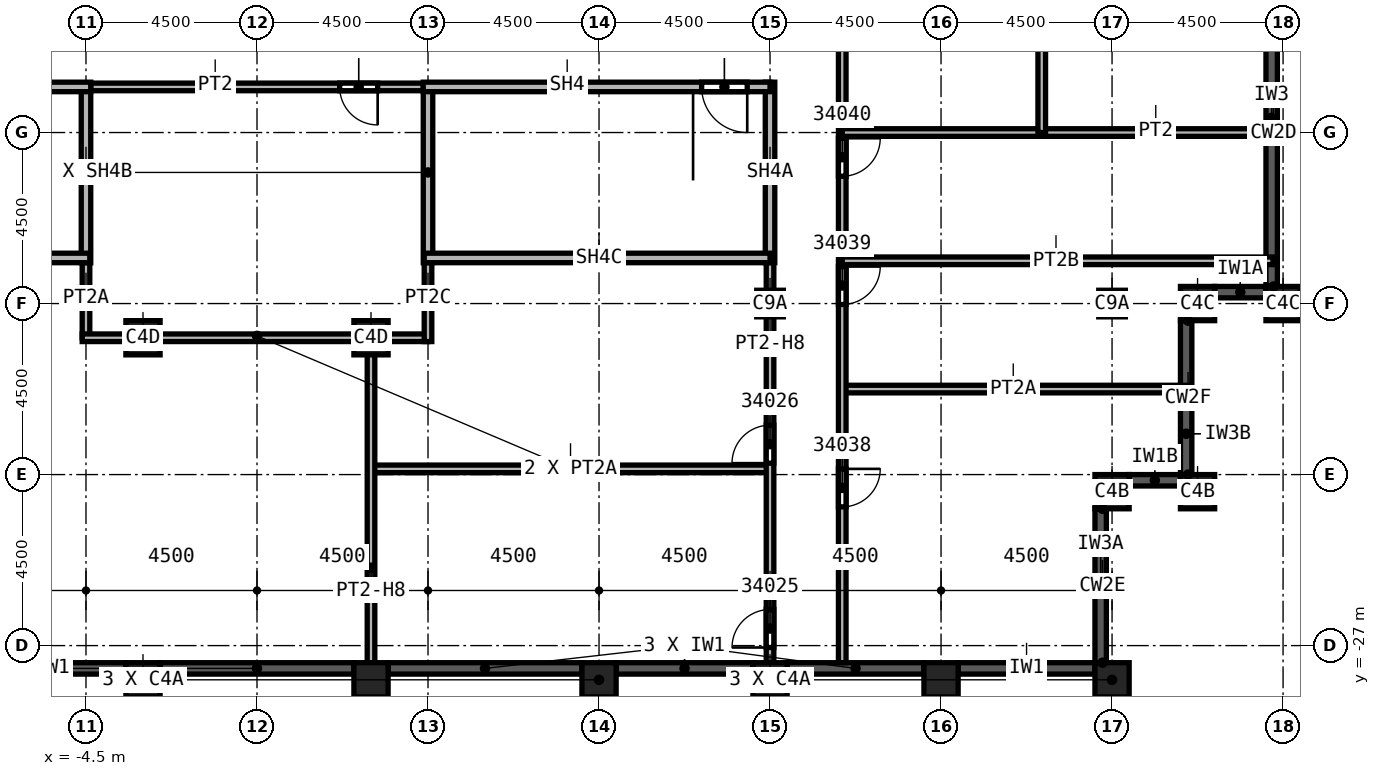
"""IFC4 building model, lengths in metres.
Left out: names, types, materials, properties, quantities, classifications, styles, units other than length and angle.
Written with IfcOpenShell. Run it as: python <this file> out.ifc"""

import sys

from ifc_helpers import new_model, si_unit, direction, frame, frame_2d, origin, origin_2d, place, context, subcontext, project, spatial, polyline, rectangle, outline, extrude, element, fill, save


model = new_model("IFC4")
c1 = context("Model", 3, precision=1e-05, world=origin(), true_north=direction((0.0, 1.0)))
c2 = subcontext(c1, "Body", "Model", "MODEL_VIEW")
j1 = project(units=[si_unit("LENGTHUNIT", "METRE"), si_unit("PLANEANGLEUNIT", "RADIAN")], contexts=[c1])
p1 = place(None, origin())
s1 = spatial("IfcSite", under=j1, at=p1, CompositionType="ELEMENT")
p2 = place(p1, origin())
s2 = spatial("IfcBuilding", under=s1, at=p2, CompositionType="ELEMENT")
p3 = place(p2, frame((0.0, 0.0, 366.0)))
s3 = spatial("IfcBuildingStorey", under=s2, at=p3, CompositionType="ELEMENT", Elevation=366.0)
for number, where, z_axis, x_axis in (
    (1, (13.5, -18.0, 0.0), (0.0, 0.0, 1.0), (1.0, 0.0, 0.0)),
    (2, (22.5, -18.0, 0.0), (0.0, 0.0, 1.0), (1.0, 0.0, 0.0)),
):
    element("IfcColumn", number, at=place(p3, frame(where, z_axis=z_axis, x_axis=x_axis)), inside=s3, PredefinedType="COLUMN", context=c2, shape_type="SweptSolid", body=[
        extrude(rectangle(XDim=0.7, YDim=0.7, at=origin_2d()), origin(), (0.0, 0.0, 1.0), 9.532),
    ])
p4 = place(p3, frame((27.0, -18.0, 0.0), z_axis=(0.0, 0.0, 1.0), x_axis=(0.0, 1.0, 0.0)))
e3 = element("IfcColumn", 3, at=p4, inside=s3, PredefinedType="COLUMN", context=c2, shape_type="SweptSolid", body=[
    extrude(rectangle(XDim=0.9, YDim=0.9, at=origin_2d()), origin(), (0.0, 0.0, 1.0), 9.532),
])
for number, where, z_axis, x_axis in (
    (4, (3.0, -27.9, 0.0), (0.0, 0.0, 1.0), (1.0, 0.0, 0.0)),
    (5, (9.0, -27.9, 0.0), (0.0, 0.0, 1.0), (1.0, 0.0, 0.0)),
    (6, (13.5, -27.9, 0.0), (0.0, 0.0, 1.0), (1.0, 0.0, 0.0)),
    (7, (18.0, -27.9, 0.0), (0.0, 0.0, 1.0), (1.0, 0.0, 0.0)),
    (8, (22.5, -27.9, 0.0), (0.0, 0.0, 1.0), (1.0, 0.0, 0.0)),
    (9, (-3.0, -27.9, 0.0), (0.0, 0.0, 1.0), (1.0, 0.0, 0.0)),
):
    element("IfcColumn", number, at=place(p3, frame(where, z_axis=z_axis, x_axis=x_axis)), inside=s3, PredefinedType="COLUMN", context=c2, shape_type="SweptSolid", body=[
        extrude(rectangle(XDim=0.9, YDim=0.9, at=origin_2d()), origin(), (0.0, 0.0, 1.0), 4.919),
    ])
for number, where, z_axis, x_axis in (
    (10, (3.0, -18.9, 0.0), (0.0, 0.0, 1.0), (1.0, 0.0, 0.0)),
    (11, (-3.0, -18.9, 0.0), (0.0, 0.0, 1.0), (1.0, 0.0, 0.0)),
):
    element("IfcColumn", number, at=place(p3, frame(where, z_axis=z_axis, x_axis=x_axis)), inside=s3, PredefinedType="COLUMN", context=c2, shape_type="SweptSolid", body=[
        extrude(rectangle(XDim=0.9, YDim=0.9, at=origin_2d()), origin(), (0.0, 0.0, 1.0), 9.113),
    ])
for number, where, z_axis, x_axis in (
    (12, (22.5, -22.95, 0.0), (0.0, 0.0, 1.0), (1.0, 0.0, 0.0)),
    (13, (24.75, -22.95, 0.0), (0.0, 0.0, 1.0), (1.0, 0.0, 0.0)),
):
    element("IfcColumn", number, at=place(p3, frame(where, z_axis=z_axis, x_axis=x_axis)), inside=s3, PredefinedType="COLUMN", context=c2, shape_type="SweptSolid", body=[
        extrude(rectangle(XDim=0.9, YDim=0.9, at=origin_2d()), origin(), (0.0, 0.0, 1.0), 7.225),
    ])
p5 = place(p3, frame((24.75, -18.0, 0.0), z_axis=(0.0, 0.0, 1.0), x_axis=(1.0, 0.0, 0.0)))
e14 = element("IfcColumn", 14, at=p5, inside=s3, PredefinedType="COLUMN", context=c2, shape_type="SweptSolid", body=[
    extrude(rectangle(XDim=0.9, YDim=0.9, at=origin_2d()), origin(), (0.0, 0.0, 1.0), 9.532),
])
for number, where, z_axis, x_axis in (
    (15, (-8.55, -27.6, 0.0), (0.0, 0.0, 1.0), (1.0, 0.0, 0.0)),
    (16, (-2.55, -27.6, 0.0), (0.0, 0.0, 1.0), (1.0, 0.0, 0.0)),
    (17, (3.45, -27.6, 0.0), (0.0, 0.0, 1.0), (1.0, 0.0, 0.0)),
):
    element("IfcWall", number, at=place(p3, frame(where, z_axis=z_axis, x_axis=x_axis)), inside=s3, PredefinedType="SOLIDWALL", context=c2, shape_type="SweptSolid", body=[
        extrude(rectangle(XDim=5.1, YDim=0.3, at=frame_2d((2.55, 0.0))), origin(), (0.0, 0.0, 1.0), 5.4),
    ])
for number, where, z_axis, x_axis in (
    (18, (9.45, -27.6, 0.0), (0.0, 0.0, 1.0), (1.0, 0.0, 0.0)),
    (19, (13.95, -27.6, 0.0), (0.0, 0.0, 1.0), (1.0, 0.0, 0.0)),
    (20, (18.45, -27.6, 0.0), (0.0, 0.0, 1.0), (1.0, 0.0, 0.0)),
):
    element("IfcWall", number, at=place(p3, frame(where, z_axis=z_axis, x_axis=x_axis)), inside=s3, PredefinedType="SOLIDWALL", context=c2, shape_type="SweptSolid", body=[
        extrude(rectangle(XDim=3.6, YDim=0.3, at=frame_2d((1.8, 0.0))), origin(), (0.0, 0.0, 1.0), 5.4),
    ])
p6 = place(p3, frame((22.2, -27.45, 5.633), z_axis=(0.0, 0.0, 1.0), x_axis=(0.0, 1.0, 0.0)))
e21 = element("IfcWall", 21, at=p6, inside=s3, PredefinedType="SOLIDWALL", context=c2, shape_type="SweptSolid", body=[
    extrude(outline(polyline([(0.0, 0.0), (4.05, 0.0), (4.05, 1.84), (0.0, 0.05), (0.0, 0.0)])), frame((0.0, 0.15, 0.0), z_axis=(0.0, -1.0, 0.0), x_axis=(1.0, 0.0, 0.0)), (0.0, 0.0, 1.0), 0.3),
])
p7 = place(p3, frame((22.95, -22.65, 0.0), z_axis=(0.0, 0.0, 1.0), x_axis=(1.0, 0.0, 0.0)))
e22 = element("IfcWall", 22, at=p7, inside=s3, PredefinedType="SOLIDWALL", context=c2, shape_type="SweptSolid", body=[
    extrude(rectangle(XDim=1.35, YDim=0.3, at=frame_2d((0.675, 0.0))), origin(), (0.0, 0.0, 1.0), 7.707),
])
p8 = place(p3, frame((24.45, -22.5, 7.939), z_axis=(0.0, 0.0, 1.0), x_axis=(0.0, 1.0, 0.0)))
e23 = element("IfcWall", 23, at=p8, inside=s3, PredefinedType="SOLIDWALL", context=c2, shape_type="SweptSolid", body=[
    extrude(outline(polyline([(0.0, 0.0), (4.05, 0.0), (4.05, 1.841), (0.0, 0.05), (0.0, 0.0)])), frame((0.0, 0.15, 0.0), z_axis=(0.0, -1.0, 0.0), x_axis=(1.0, 0.0, 0.0)), (0.0, 0.0, 1.0), 0.3),
])
p9 = place(p3, frame((25.2, -17.7, 0.0), z_axis=(0.0, 0.0, 1.0), x_axis=(1.0, 0.0, 0.0)))
e24 = element("IfcWall", 24, at=p9, inside=s3, PredefinedType="SOLIDWALL", context=c2, shape_type="SweptSolid", body=[
    extrude(rectangle(XDim=1.35, YDim=0.3, at=frame_2d((0.675, 0.0))), origin(), (0.0, 0.0, 1.0), 10.013),
])
p10 = place(p3, frame((26.7, -17.55, 10.246), z_axis=(0.0, 0.0, 1.0), x_axis=(0.0, 1.0, 0.0)))
e25 = element("IfcWall", 25, at=p10, inside=s3, PredefinedType="SOLIDWALL", context=c2, shape_type="SweptSolid", body=[
    extrude(outline(polyline([(0.0, 0.0), (8.1, 0.0), (8.1, 3.728), (0.0, 0.05), (0.0, 0.0)])), frame((0.0, 0.15, 0.0), z_axis=(0.0, -1.0, 0.0), x_axis=(1.0, 0.0, 0.0)), (0.0, 0.0, 1.0), 0.3),
])
p11 = place(p3, frame((-4.5, -18.9, 0.0), z_axis=(0.0, 0.0, 1.0), x_axis=(0.0, 1.0, 0.0)))
e26 = element("IfcWall", 26, at=p11, inside=s3, PredefinedType="PARTITIONING", context=c2, shape_type="SweptSolid", body=[
    extrude(rectangle(XDim=2.1, YDim=0.2, at=frame_2d((1.05, 0.0))), origin(), (0.0, 0.0, 1.0), 5.76),
])
p12 = place(p3, frame((4.5, -18.9, 0.0), z_axis=(0.0, 0.0, 1.0), x_axis=(-1.0, 0.0, 0.0)))
e27 = element("IfcWall", 27, at=p12, inside=s3, PredefinedType="PARTITIONING", context=c2, shape_type="SweptSolid", body=[
    extrude(rectangle(XDim=9.1, YDim=0.2, at=frame_2d((4.55, 0.0))), origin(), (0.0, 0.0, 1.0), 5.76),
])
p13 = place(p3, frame((3.0, -22.35, 0.0), z_axis=(0.0, 0.0, 1.0), x_axis=(1.0, 0.0, 0.0)))
e28 = element("IfcWall", 28, at=p13, inside=s3, PredefinedType="PARTITIONING", context=c2, shape_type="SweptSolid", body=[
    extrude(rectangle(XDim=10.5, YDim=0.2, at=frame_2d((5.25, 0.0))), origin(), (0.0, 0.0, 1.0), 5.76),
])
p14 = place(p3, frame((3.0, -18.9, 0.0), z_axis=(0.0, 0.0, 1.0), x_axis=(0.0, -1.0, 0.0)))
e29 = element("IfcWall", 29, at=p14, inside=s3, PredefinedType="PARTITIONING", context=c2, shape_type="SweptSolid", body=[
    extrude(rectangle(XDim=8.55, YDim=0.2, at=frame_2d((4.275, 0.0))), origin(), (0.0, 0.0, 1.0), 4.916),
])
p15 = place(p3, frame((4.5, -16.8, 0.0), z_axis=(0.0, 0.0, 1.0), x_axis=(0.0, -1.0, 0.0)))
e30 = element("IfcWall", 30, at=p15, inside=s3, PredefinedType="PARTITIONING", context=c2, shape_type="SweptSolid", body=[
    extrude(rectangle(XDim=2.2, YDim=0.2, at=frame_2d((1.1, 0.0))), origin(), (0.0, 0.0, 1.0), 8.136),
])
p16 = place(p3, frame((4.625, -12.3, 0.0), z_axis=(0.0, 0.0, 1.0), x_axis=(-1.0, 0.0, 0.0)))
e31 = element("IfcWall", 31, at=p16, inside=s3, PredefinedType="PARTITIONING", context=c2, shape_type="SweptSolid", body=[
    extrude(rectangle(XDim=9.25, YDim=0.2, at=frame_2d((4.625, 0.0))), origin(), (0.0, 0.0, 1.0), 9.15),
])
p17 = place(p16, frame((1.45, 0.0, 0.0)))
e32 = element("IfcOpeningElement", 32, at=p17, cuts=e31, PredefinedType="OPENING", context=c2, shape_type="SweptSolid", body=[
    extrude(rectangle(XDim=1.0, YDim=2.1, at=frame_2d((0.5, 1.05))), frame((0.0, 0.1, 0.0), z_axis=(0.0, -1.0, 0.0), x_axis=(1.0, 0.0, 0.0)), (0.0, 0.0, 1.0), 0.2),
])
p18 = place(p3, frame((13.5, -27.45, 0.0), z_axis=(0.0, 0.0, 1.0), x_axis=(0.0, 1.0, 0.0)))
e33 = element("IfcWall", 33, at=p18, inside=s3, PredefinedType="PARTITIONING", context=c2, shape_type="SweptSolid", body=[
    extrude(rectangle(XDim=10.775, YDim=0.2, at=frame_2d((5.387, 0.0))), origin(), (0.0, 0.0, 1.0), 4.916),
])
p19 = place(p18, frame((0.4, 0.0, 0.0)))
e34 = element("IfcOpeningElement", 34, at=p19, cuts=e33, PredefinedType="OPENING", context=c2, shape_type="SweptSolid", body=[
    extrude(rectangle(XDim=1.0, YDim=2.1, at=frame_2d((0.5, 1.05))), frame((0.0, 0.1, 0.0), z_axis=(0.0, -1.0, 0.0), x_axis=(1.0, 0.0, 0.0)), (0.0, 0.0, 1.0), 0.2),
])
p20 = place(p18, frame((5.25, 0.0, 0.0)))
e35 = element("IfcOpeningElement", 35, at=p20, cuts=e33, PredefinedType="OPENING", context=c2, shape_type="SweptSolid", body=[
    extrude(rectangle(XDim=1.0, YDim=2.1, at=frame_2d((0.5, 1.05))), frame((0.0, 0.1, 0.0), z_axis=(0.0, -1.0, 0.0), x_axis=(1.0, 0.0, 0.0)), (0.0, 0.0, 1.0), 0.2),
])
p21 = place(p3, frame((15.4, -20.25, 0.0), z_axis=(0.0, 0.0, 1.0), x_axis=(1.0, 0.0, 0.0)))
e36 = element("IfcWall", 36, at=p21, inside=s3, PredefinedType="PARTITIONING", context=c2, shape_type="SweptSolid", body=[
    extrude(rectangle(XDim=9.086, YDim=0.2, at=frame_2d((4.543, 0.0))), origin(), (0.0, 0.0, 1.0), 5.76),
])
p22 = place(p3, frame((15.4, 27.636, 0.0), z_axis=(0.0, 0.0, 1.0), x_axis=(0.0, -1.0, 0.0)))
e37 = element("IfcWall", 37, at=p22, inside=s3, PredefinedType="PARTITIONING", context=c2, shape_type="SweptSolid", body=[
    extrude(rectangle(XDim=55.086, YDim=0.2, at=frame_2d((27.543, 0.0))), origin(), (0.0, 0.0, 1.0), 5.76),
])
p23 = place(p22, frame((26.436, 0.0, 0.0)))
e38 = element("IfcOpeningElement", 38, at=p23, cuts=e37, PredefinedType="OPENING", context=c2, shape_type="SweptSolid", body=[
    extrude(rectangle(XDim=1.0, YDim=2.1, at=frame_2d((0.5, 1.05))), frame((0.0, 0.1, 0.0), z_axis=(0.0, -1.0, 0.0), x_axis=(1.0, 0.0, 0.0)), (0.0, 0.0, 1.0), 0.2),
])
p24 = place(p22, frame((21.936, 0.0, 0.0)))
e39 = element("IfcOpeningElement", 39, at=p24, cuts=e37, PredefinedType="OPENING", context=c2, shape_type="SweptSolid", body=[
    extrude(rectangle(XDim=1.0, YDim=2.1, at=frame_2d((0.5, 1.05))), frame((0.0, 0.1, 0.0), z_axis=(0.0, -1.0, 0.0), x_axis=(1.0, 0.0, 0.0)), (0.0, 0.0, 1.0), 0.2),
])
p25 = place(p22, frame((9.7, 0.0, 0.0)))
e40 = element("IfcOpeningElement", 40, at=p25, cuts=e37, PredefinedType="OPENING", context=c2, shape_type="SweptSolid", body=[
    extrude(rectangle(XDim=1.0, YDim=2.1, at=frame_2d((0.5, 1.05))), frame((0.0, 0.1, 0.0), z_axis=(0.0, -1.0, 0.0), x_axis=(1.0, 0.0, 0.0)), (0.0, 0.0, 1.0), 0.2),
])
p26 = place(p22, frame((49.986, 0.0, 0.0)))
e41 = element("IfcOpeningElement", 41, at=p26, cuts=e37, PredefinedType="OPENING", context=c2, shape_type="SweptSolid", body=[
    extrude(rectangle(XDim=1.0, YDim=2.1, at=frame_2d((0.5, 1.05))), frame((0.0, 0.1, 0.0), z_axis=(0.0, -1.0, 0.0), x_axis=(1.0, 0.0, 0.0)), (0.0, 0.0, 1.0), 0.2),
])
p27 = place(p22, frame((44.661, 0.0, 0.0)))
e42 = element("IfcOpeningElement", 42, at=p27, cuts=e37, PredefinedType="OPENING", context=c2, shape_type="SweptSolid", body=[
    extrude(rectangle(XDim=1.0, YDim=2.1, at=frame_2d((0.5, 1.05))), frame((0.0, 0.1, 0.0), z_axis=(0.0, -1.0, 0.0), x_axis=(1.0, 0.0, 0.0)), (0.0, 0.0, 1.0), 0.2),
])
p28 = place(p22, frame((41.286, 0.0, 0.0)))
e43 = element("IfcOpeningElement", 43, at=p28, cuts=e37, PredefinedType="OPENING", context=c2, shape_type="SweptSolid", body=[
    extrude(rectangle(XDim=1.0, YDim=2.1, at=frame_2d((0.5, 1.05))), frame((0.0, 0.1, 0.0), z_axis=(0.0, -1.0, 0.0), x_axis=(1.0, 0.0, 0.0)), (0.0, 0.0, 1.0), 0.2),
])
p29 = place(p22, frame((36.636, 0.0, 0.0)))
e44 = element("IfcOpeningElement", 44, at=p29, cuts=e37, PredefinedType="OPENING", context=c2, shape_type="SweptSolid", body=[
    extrude(rectangle(XDim=1.0, YDim=2.1, at=frame_2d((0.5, 1.05))), frame((0.0, 0.1, 0.0), z_axis=(0.0, -1.0, 0.0), x_axis=(1.0, 0.0, 0.0)), (0.0, 0.0, 1.0), 0.2),
])
p30 = place(p3, frame((15.4, -16.875, 0.0), z_axis=(0.0, 0.0, 1.0), x_axis=(1.0, 0.0, 0.0)))
e45 = element("IfcWall", 45, at=p30, inside=s3, PredefinedType="PARTITIONING", context=c2, shape_type="SweptSolid", body=[
    extrude(rectangle(XDim=11.336, YDim=0.2, at=frame_2d((5.668, 0.0))), origin(), (0.0, 0.0, 1.0), 9.115),
])
p31 = place(p3, frame((15.4, -13.5, 0.0), z_axis=(0.0, 0.0, 1.0), x_axis=(1.0, 0.0, 0.0)))
e46 = element("IfcWall", 46, at=p31, inside=s3, PredefinedType="PARTITIONING", context=c2, shape_type="SweptSolid", body=[
    extrude(rectangle(XDim=11.15, YDim=0.2, at=frame_2d((5.575, 0.0))), origin(), (0.0, 0.0, 1.0), 9.15),
])
p32 = place(p3, frame((20.65, 0.0, 0.0), z_axis=(0.0, 0.0, 1.0), x_axis=(0.0, -1.0, 0.0)))
e47 = element("IfcWall", 47, at=p32, inside=s3, PredefinedType="PARTITIONING", context=c2, shape_type="SweptSolid", body=[
    extrude(rectangle(XDim=13.5, YDim=0.2, at=frame_2d((6.75, 0.0))), origin(), (0.0, 0.0, 1.0), 9.15),
])
p33 = place(p32, frame((7.15, 0.0, 0.0)))
e48 = element("IfcOpeningElement", 48, at=p33, cuts=e47, PredefinedType="OPENING", context=c2, shape_type="SweptSolid", body=[
    extrude(rectangle(XDim=1.0, YDim=2.1, at=frame_2d((0.5, 1.05))), frame((0.0, 0.1, 0.0), z_axis=(0.0, -1.0, 0.0), x_axis=(1.0, 0.0, 0.0)), (0.0, 0.0, 1.0), 0.2),
])
p34 = place(p3, frame((-4.5, -12.3, 0.0), z_axis=(0.0, 0.0, 1.0), x_axis=(0.0, -1.0, 0.0)))
e49 = element("IfcWall", 49, at=p34, inside=s3, PredefinedType="SOLIDWALL", context=c2, shape_type="SweptSolid", body=[
    extrude(rectangle(XDim=4.625, YDim=0.25, at=frame_2d((2.312, 0.0))), origin(), (0.0, 0.0, 1.0), 9.744),
])
p35 = place(p3, frame((-4.4, -16.8, 0.0), z_axis=(0.0, 0.0, 1.0), x_axis=(-1.0, 0.0, 0.0)))
e50 = element("IfcWall", 50, at=p35, inside=s3, PredefinedType="SOLIDWALL", context=c2, shape_type="SweptSolid", body=[
    extrude(rectangle(XDim=9.1, YDim=0.25, at=frame_2d((4.55, 0.0))), origin(), (0.0, 0.0, 1.0), 5.76),
])
p36 = place(p3, frame((-4.375, -12.3, 0.0), z_axis=(0.0, 0.0, 1.0), x_axis=(-1.0, 0.0, 0.0)))
e51 = element("IfcWall", 51, at=p36, inside=s3, PredefinedType="SOLIDWALL", context=c2, shape_type="SweptSolid", body=[
    extrude(rectangle(XDim=9.125, YDim=0.25, at=frame_2d((4.562, 0.0))), origin(), (0.0, 0.0, 1.0), 9.15),
])
p37 = place(p36, frame((7.2, 0.0, 0.0)))
e52 = element("IfcOpeningElement", 52, at=p37, cuts=e51, PredefinedType="OPENING", context=c2, shape_type="SweptSolid", body=[
    extrude(rectangle(XDim=1.2, YDim=2.1, at=frame_2d((0.6, 1.05))), frame((0.0, 0.125, 0.0), z_axis=(0.0, -1.0, 0.0), x_axis=(1.0, 0.0, 0.0)), (0.0, 0.0, 1.0), 0.25),
])
p38 = place(p3, frame((4.5, -16.925, 0.0), z_axis=(0.0, 0.0, 1.0), x_axis=(0.0, 1.0, 0.0)))
e53 = element("IfcWall", 53, at=p38, inside=s3, PredefinedType="SOLIDWALL", context=c2, shape_type="SweptSolid", body=[
    extrude(rectangle(XDim=4.625, YDim=0.25, at=frame_2d((2.312, 0.0))), origin(), (0.0, 0.0, 1.0), 9.744),
])
p39 = place(p3, frame((13.5, -16.925, 0.0), z_axis=(0.0, 0.0, 1.0), x_axis=(0.0, 1.0, 0.0)))
e54 = element("IfcWall", 54, at=p39, inside=s3, PredefinedType="SOLIDWALL", context=c2, shape_type="SweptSolid", body=[
    extrude(rectangle(XDim=4.75, YDim=0.25, at=frame_2d((2.375, 0.0))), origin(), (0.0, 0.0, 1.0), 5.76),
])
p40 = place(p3, frame((13.5, -16.8, 0.0), z_axis=(0.0, 0.0, 1.0), x_axis=(-1.0, 0.0, 0.0)))
e55 = element("IfcWall", 55, at=p40, inside=s3, PredefinedType="SOLIDWALL", context=c2, shape_type="SweptSolid", body=[
    extrude(rectangle(XDim=9.1, YDim=0.25, at=frame_2d((4.55, 0.0))), origin(), (0.0, 0.0, 1.0), 8.136),
])
p41 = place(p3, frame((13.5, -12.3, 0.0), z_axis=(0.0, 0.0, 1.0), x_axis=(-1.0, 0.0, 0.0)))
e56 = element("IfcWall", 56, at=p41, inside=s3, PredefinedType="SOLIDWALL", context=c2, shape_type="SweptSolid", body=[
    extrude(rectangle(XDim=9.125, YDim=0.25, at=frame_2d((4.562, 0.0))), origin(), (0.0, 0.0, 1.0), 9.15),
])
p42 = place(p41, frame((0.6, 0.0, 0.0)))
e57 = element("IfcOpeningElement", 57, at=p42, cuts=e56, PredefinedType="OPENING", context=c2, shape_type="SweptSolid", body=[
    extrude(rectangle(XDim=1.2, YDim=2.1, at=frame_2d((0.6, 1.05))), frame((0.0, 0.125, 0.0), z_axis=(0.0, -1.0, 0.0), x_axis=(1.0, 0.0, 0.0)), (0.0, 0.0, 1.0), 0.25),
])
p43 = place(p42, origin())
e58 = element("IfcDoor", 58, at=p43, inside=s3, OperationType="SINGLE_SWING_LEFT", PredefinedType="DOOR", context=c2, shape_type="SweptSolid", body=[
    extrude(rectangle(XDim=1.2, YDim=2.1, at=frame_2d((0.6, 1.05))), frame((0.0, 0.025, 0.0), z_axis=(0.0, -1.0, 0.0), x_axis=(1.0, 0.0, 0.0)), (0.0, 0.0, 1.0), 0.05),
])
fill(e57, e58)
p44 = place(p17, origin())
e59 = element("IfcDoor", 59, at=p44, inside=s3, OperationType="SINGLE_SWING_RIGHT", PredefinedType="DOOR", context=c2, shape_type="SweptSolid", body=[
    extrude(rectangle(XDim=1.0, YDim=2.1, at=frame_2d((0.5, 1.05))), frame((0.0, 0.025, 0.0), z_axis=(0.0, -1.0, 0.0), x_axis=(1.0, 0.0, 0.0)), (0.0, 0.0, 1.0), 0.05),
])
fill(e32, e59)
p45 = place(p19, origin())
e60 = element("IfcDoor", 60, at=p45, inside=s3, OperationType="SINGLE_SWING_RIGHT", PredefinedType="DOOR", context=c2, shape_type="SweptSolid", body=[
    extrude(rectangle(XDim=1.0, YDim=2.1, at=frame_2d((0.5, 1.05))), frame((0.0, 0.025, 0.0), z_axis=(0.0, -1.0, 0.0), x_axis=(1.0, 0.0, 0.0)), (0.0, 0.0, 1.0), 0.05),
])
fill(e34, e60)
p46 = place(p20, origin())
e61 = element("IfcDoor", 61, at=p46, inside=s3, OperationType="SINGLE_SWING_LEFT", PredefinedType="DOOR", context=c2, shape_type="SweptSolid", body=[
    extrude(rectangle(XDim=1.0, YDim=2.1, at=frame_2d((0.5, 1.05))), frame((0.0, 0.025, 0.0), z_axis=(0.0, -1.0, 0.0), x_axis=(1.0, 0.0, 0.0)), (0.0, 0.0, 1.0), 0.05),
])
fill(e35, e61)
p47 = place(p26, origin())
e62 = element("IfcDoor", 62, at=p47, inside=s3, OperationType="SINGLE_SWING_LEFT", PredefinedType="DOOR", context=c2, shape_type="SweptSolid", body=[
    extrude(rectangle(XDim=1.0, YDim=2.1, at=frame_2d((0.5, 1.05))), frame((0.0, 0.025, 0.0), z_axis=(0.0, -1.0, 0.0), x_axis=(1.0, 0.0, 0.0)), (0.0, 0.0, 1.0), 0.05),
])
fill(e41, e62)
p48 = place(p27, origin())
e63 = element("IfcDoor", 63, at=p48, inside=s3, OperationType="SINGLE_SWING_RIGHT", PredefinedType="DOOR", context=c2, shape_type="SweptSolid", body=[
    extrude(rectangle(XDim=1.0, YDim=2.1, at=frame_2d((0.5, 1.05))), frame((0.0, 0.025, 0.0), z_axis=(0.0, -1.0, 0.0), x_axis=(1.0, 0.0, 0.0)), (0.0, 0.0, 1.0), 0.05),
])
fill(e42, e63)
p49 = place(p28, origin())
e64 = element("IfcDoor", 64, at=p49, inside=s3, OperationType="SINGLE_SWING_LEFT", PredefinedType="DOOR", context=c2, shape_type="SweptSolid", body=[
    extrude(rectangle(XDim=1.0, YDim=2.1, at=frame_2d((0.5, 1.05))), frame((0.0, 0.025, 0.0), z_axis=(0.0, -1.0, 0.0), x_axis=(1.0, 0.0, 0.0)), (0.0, 0.0, 1.0), 0.05),
])
fill(e43, e64)
save(model, sys.argv[1])
